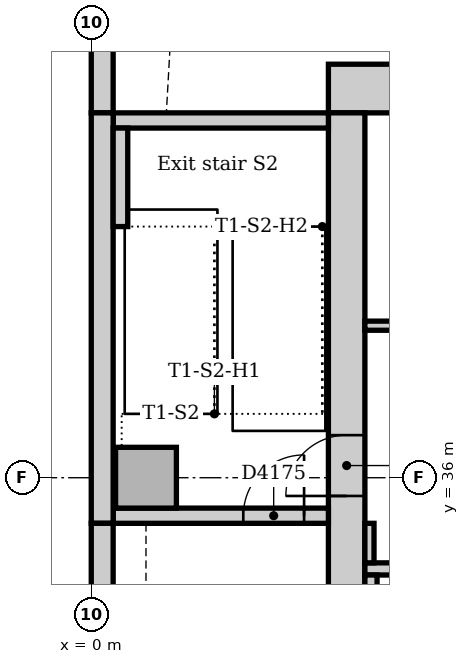
"""IFC4 building model, lengths in metres.
Left out: names, types, materials, properties, quantities, classifications, styles, units other than length and angle.
Written with IfcOpenShell. Run it as: python <this file> out.ifc"""

import sys

from ifc_helpers import new_model, si_unit, direction, frame, frame_2d, origin, origin_2d, place, context, subcontext, project, spatial, rectangle, extrude, element, fill, save


model = new_model("IFC4")
c1 = context("Model", 3, precision=1e-05, world=origin(), true_north=direction((0.0, 1.0)))
c2 = subcontext(c1, "Body", "Model", "MODEL_VIEW")
j1 = project(units=[si_unit("LENGTHUNIT", "METRE"), si_unit("PLANEANGLEUNIT", "RADIAN")], contexts=[c1])
p1 = place(None, origin())
s1 = spatial("IfcSite", under=j1, at=p1, CompositionType="ELEMENT")
p2 = place(p1, origin())
s2 = spatial("IfcBuilding", under=s1, at=p2, CompositionType="ELEMENT")
p3 = place(p2, frame((0.0, 0.0, 124.0)))
s3 = spatial("IfcBuildingStorey", under=s2, at=p3, CompositionType="ELEMENT", Elevation=124.0)
p4 = place(p3, frame((23.3, 42.4, 0.0), z_axis=(0.0, 0.0, 1.0), x_axis=(-1.0, 0.0, 0.0)))
e1 = element("IfcWall", 1, at=p4, inside=s3, PredefinedType="SOLIDWALL", context=c2, shape_type="SweptSolid", body=[
    extrude(rectangle(XDim=19.4, YDim=0.8, at=frame_2d((9.7, 0.0))), origin(), (0.0, 0.0, 1.0), 4.0),
])
p5 = place(p3, frame((4.2, 42.0, 0.0), z_axis=(0.0, 0.0, 1.0), x_axis=(0.0, -1.0, 0.0)))
e2 = element("IfcWall", 2, at=p5, inside=s3, PredefinedType="SOLIDWALL", context=c2, shape_type="SweptSolid", body=[
    extrude(rectangle(XDim=10.5, YDim=0.6, at=frame_2d((5.25, 0.0))), origin(), (0.0, 0.0, 1.0), 4.0),
])
p6 = place(p5, frame((5.3, 0.0, 0.0)))
e3 = element("IfcOpeningElement", 3, at=p6, cuts=e2, PredefinedType="OPENING", context=c2, shape_type="SweptSolid", body=[
    extrude(rectangle(XDim=1.0, YDim=2.1, at=frame_2d((0.5, 1.05))), frame((0.0, 0.31, 0.0), z_axis=(0.0, -1.0, 0.0), x_axis=(1.0, 0.0, 0.0)), (0.0, 0.0, 1.0), 0.62),
])
p7 = place(p3, frame((0.36, 35.375, 0.0), z_axis=(0.0, 0.0, 1.0), x_axis=(1.0, 0.0, 0.0)))
e4 = element("IfcWall", 4, at=p7, inside=s3, PredefinedType="SOLIDWALL", context=c2, shape_type="SweptSolid", body=[
    extrude(rectangle(XDim=3.54, YDim=0.25, at=frame_2d((1.77, 0.0))), origin(), (0.0, 0.0, 1.0), 4.0),
])
p8 = place(p7, frame((2.14, 0.0, 0.0)))
e5 = element("IfcOpeningElement", 5, at=p8, cuts=e4, PredefinedType="OPENING", context=c2, shape_type="SweptSolid", body=[
    extrude(rectangle(XDim=1.0, YDim=2.1, at=frame_2d((0.5, 1.05))), frame((0.0, 0.135, 0.0), z_axis=(0.0, -1.0, 0.0), x_axis=(1.0, 0.0, 0.0)), (0.0, 0.0, 1.0), 0.27),
])
p9 = place(p3, frame((3.9, 41.875, 0.0), z_axis=(0.0, 0.0, 1.0), x_axis=(-1.0, 0.0, 0.0)))
e6 = element("IfcWall", 6, at=p9, inside=s3, PredefinedType="SOLIDWALL", context=c2, shape_type="SweptSolid", body=[
    extrude(rectangle(XDim=3.54, YDim=0.25, at=frame_2d((1.77, 0.0))), origin(), (0.0, 0.0, 1.0), 4.0),
])
p10 = place(p3, frame((0.9, 36.0, 0.0), z_axis=(0.0, 0.0, 1.0), x_axis=(1.0, 0.0, 0.0)))
e7 = element("IfcColumn", 7, at=p10, inside=s3, PredefinedType="COLUMN", context=c2, shape_type="SweptSolid", body=[
    extrude(rectangle(XDim=1.0, YDim=1.0, at=origin_2d()), origin(), (0.0, 0.0, 1.0), 4.0),
])
p11 = place(p3, frame((0.18, 45.257, 0.0), z_axis=(0.0, 0.0, 1.0), x_axis=(0.0, -1.0, 0.0)))
e8 = element("IfcWall", 8, at=p11, inside=s3, PredefinedType="STANDARD", context=c2, shape_type="SweptSolid", body=[
    extrude(rectangle(XDim=3.257, YDim=0.36, at=frame_2d((1.629, 0.0))), origin(), (0.0, 0.0, 1.0), 3.85),
])
p12 = place(p3, frame((0.18, 42.0, 0.0), z_axis=(0.0, 0.0, 1.0), x_axis=(0.0, -1.0, 0.0)))
e9 = element("IfcWall", 9, at=p12, inside=s3, PredefinedType="STANDARD", context=c2, shape_type="SweptSolid", body=[
    extrude(rectangle(XDim=6.75, YDim=0.36, at=frame_2d((3.375, 0.0))), origin(), (0.0, 0.0, 1.0), 3.85),
])
p13 = place(p3, frame((0.18, 35.25, 0.0), z_axis=(0.0, 0.0, 1.0), x_axis=(0.0, -1.0, 0.0)))
e10 = element("IfcWall", 10, at=p13, inside=s3, PredefinedType="STANDARD", context=c2, shape_type="SweptSolid", body=[
    extrude(rectangle(XDim=7.5, YDim=0.36, at=frame_2d((3.75, 0.0))), origin(), (0.0, 0.0, 1.0), 3.85),
])
p14 = place(p3, frame((0.48, 40.13, 0.0), z_axis=(0.0, 0.0, 1.0), x_axis=(0.0, 1.0, 0.0)))
e11 = element("IfcWall", 11, at=p14, inside=s3, PredefinedType="STANDARD", context=c2, shape_type="SweptSolid", body=[
    extrude(rectangle(XDim=1.62, YDim=0.24, at=frame_2d((0.81, 0.0))), origin(), (0.0, 0.0, 1.0), 4.0),
])
p15 = place(p3, frame((4.5, 34.5, 0.0), z_axis=(0.0, 0.0, 1.0), x_axis=(1.0, 0.0, 0.0)))
e12 = element("IfcWall", 12, at=p15, inside=s3, PredefinedType="PARTITIONING", context=c2, shape_type="SweptSolid", body=[
    extrude(rectangle(XDim=18.0, YDim=0.2, at=frame_2d((9.0, 0.0))), origin(), (0.0, 0.0, 1.0), 3.85),
])
p16 = place(p15, frame((0.95, 0.0, 0.0)))
e13 = element("IfcOpeningElement", 13, at=p16, cuts=e12, PredefinedType="OPENING", context=c2, shape_type="SweptSolid", body=[
    extrude(rectangle(XDim=1.1, YDim=2.1, at=frame_2d((0.55, 1.05))), frame((0.0, 0.11, 0.0), z_axis=(0.0, -1.0, 0.0), x_axis=(1.0, 0.0, 0.0)), (0.0, 0.0, 1.0), 0.22),
])
p17 = place(p15, frame((3.95, 0.0, 0.0)))
e14 = element("IfcOpeningElement", 14, at=p17, cuts=e12, PredefinedType="OPENING", context=c2, shape_type="SweptSolid", body=[
    extrude(rectangle(XDim=1.1, YDim=2.1, at=frame_2d((0.55, 1.05))), frame((0.0, 0.11, 0.0), z_axis=(0.0, -1.0, 0.0), x_axis=(1.0, 0.0, 0.0)), (0.0, 0.0, 1.0), 0.22),
])
p18 = place(p15, frame((12.95, 0.0, 0.0)))
e15 = element("IfcOpeningElement", 15, at=p18, cuts=e12, PredefinedType="OPENING", context=c2, shape_type="SweptSolid", body=[
    extrude(rectangle(XDim=1.1, YDim=2.1, at=frame_2d((0.55, 1.05))), frame((0.0, 0.11, 0.0), z_axis=(0.0, -1.0, 0.0), x_axis=(1.0, 0.0, 0.0)), (0.0, 0.0, 1.0), 0.22),
])
p19 = place(p15, frame((15.95, 0.0, 0.0)))
e16 = element("IfcOpeningElement", 16, at=p19, cuts=e12, PredefinedType="OPENING", context=c2, shape_type="SweptSolid", body=[
    extrude(rectangle(XDim=1.1, YDim=2.1, at=frame_2d((0.55, 1.05))), frame((0.0, 0.11, 0.0), z_axis=(0.0, -1.0, 0.0), x_axis=(1.0, 0.0, 0.0)), (0.0, 0.0, 1.0), 0.22),
])
p20 = place(p3, frame((4.6, 31.75, 0.0), z_axis=(0.0, 0.0, 1.0), x_axis=(0.0, 1.0, 0.0)))
e17 = element("IfcWall", 17, at=p20, inside=s3, PredefinedType="PARTITIONING", context=c2, shape_type="SweptSolid", body=[
    extrude(rectangle(XDim=2.65, YDim=0.2, at=frame_2d((1.325, 0.0))), origin(), (0.0, 0.0, 1.0), 3.85),
])
p21 = place(p3, frame((4.5, 38.5, 0.0), z_axis=(0.0, 0.0, 1.0), x_axis=(1.0, 0.0, 0.0)))
e18 = element("IfcWall", 18, at=p21, inside=s3, PredefinedType="PARTITIONING", context=c2, shape_type="SweptSolid", body=[
    extrude(rectangle(XDim=11.9, YDim=0.15, at=frame_2d((5.95, 0.0))), origin(), (0.0, 0.0, 1.0), 3.85),
])
p22 = place(p21, frame((1.1, 0.0, 0.0)))
e19 = element("IfcOpeningElement", 19, at=p22, cuts=e18, PredefinedType="OPENING", context=c2, shape_type="SweptSolid", body=[
    extrude(rectangle(XDim=0.9, YDim=2.1, at=frame_2d((0.45, 1.05))), frame((0.0, 0.085, 0.0), z_axis=(0.0, -1.0, 0.0), x_axis=(1.0, 0.0, 0.0)), (0.0, 0.0, 1.0), 0.17),
])
p23 = place(p21, frame((4.8, 0.0, 0.0)))
e20 = element("IfcOpeningElement", 20, at=p23, cuts=e18, PredefinedType="OPENING", context=c2, shape_type="SweptSolid", body=[
    extrude(rectangle(XDim=0.9, YDim=2.1, at=frame_2d((0.45, 1.05))), frame((0.0, 0.085, 0.0), z_axis=(0.0, -1.0, 0.0), x_axis=(1.0, 0.0, 0.0)), (0.0, 0.0, 1.0), 0.17),
])
p24 = place(p21, frame((7.8, 0.0, 0.0)))
e21 = element("IfcOpeningElement", 21, at=p24, cuts=e18, PredefinedType="OPENING", context=c2, shape_type="SweptSolid", body=[
    extrude(rectangle(XDim=0.9, YDim=2.1, at=frame_2d((0.45, 1.05))), frame((0.0, 0.085, 0.0), z_axis=(0.0, -1.0, 0.0), x_axis=(1.0, 0.0, 0.0)), (0.0, 0.0, 1.0), 0.17),
])
p25 = place(p21, frame((9.95, 0.0, 0.0)))
e22 = element("IfcOpeningElement", 22, at=p25, cuts=e18, PredefinedType="OPENING", context=c2, shape_type="SweptSolid", body=[
    extrude(rectangle(XDim=0.8, YDim=2.1, at=frame_2d((0.4, 1.05))), frame((0.0, 0.085, 0.0), z_axis=(0.0, -1.0, 0.0), x_axis=(1.0, 0.0, 0.0)), (0.0, 0.0, 1.0), 0.17),
])
p26 = place(p3, frame((4.575, 34.6, 0.0), z_axis=(0.0, 0.0, 1.0), x_axis=(0.0, 1.0, 0.0)))
e23 = element("IfcWall", 23, at=p26, inside=s3, PredefinedType="PARTITIONING", context=c2, shape_type="SweptSolid", body=[
    extrude(rectangle(XDim=0.65, YDim=0.15, at=frame_2d((0.325, 0.0))), origin(), (0.0, 0.0, 1.0), 3.85),
])
p27 = place(p6, frame((1.0, 0.0, 0.0), z_axis=(0.0, 0.0, 1.0), x_axis=(-1.0, 0.0, 0.0)))
e24 = element("IfcDoor", 24, at=p27, inside=s3, OperationType="SINGLE_SWING_LEFT", PredefinedType="DOOR", context=c2, shape_type="SweptSolid", body=[
    extrude(rectangle(XDim=1.0, YDim=2.1, at=frame_2d((0.5, 1.05))), frame((0.0, 0.025, 0.0), z_axis=(0.0, -1.0, 0.0), x_axis=(1.0, 0.0, 0.0)), (0.0, 0.0, 1.0), 0.05),
])
fill(e3, e24)
p28 = place(p8, origin())
e25 = element("IfcDoor", 25, at=p28, inside=s3, OperationType="SINGLE_SWING_RIGHT", PredefinedType="DOOR", context=c2, shape_type="SweptSolid", body=[
    extrude(rectangle(XDim=1.0, YDim=2.1, at=frame_2d((0.5, 1.05))), frame((0.0, 0.025, 0.0), z_axis=(0.0, -1.0, 0.0), x_axis=(1.0, 0.0, 0.0)), (0.0, 0.0, 1.0), 0.05),
])
fill(e5, e25)
save(model, sys.argv[1])
